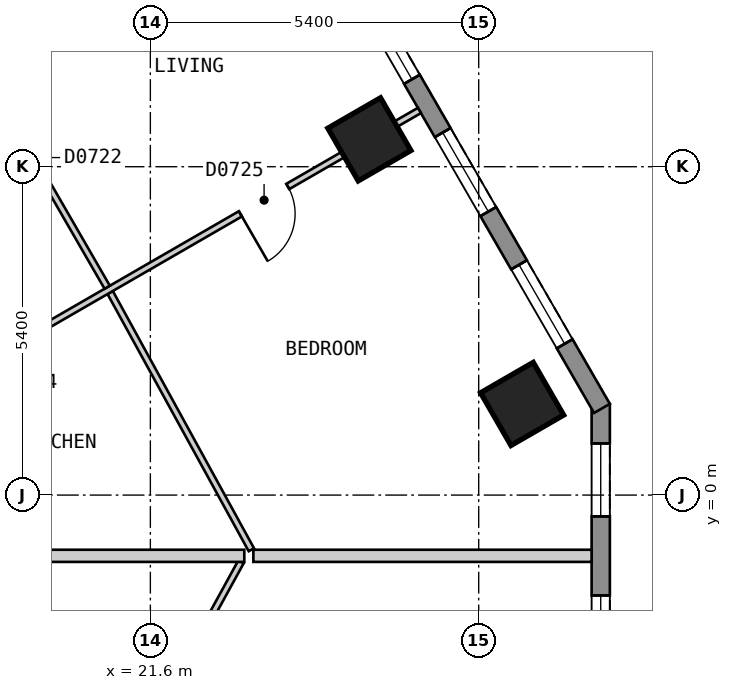
"""IFC4 building model, lengths in metres.
Left out: names, types, materials, properties, quantities, classifications, styles, units other than length and angle.
Written with IfcOpenShell. Run it as: python <this file> out.ifc"""

import sys

from ifc_helpers import new_model, si_unit, direction, frame, frame_2d, origin, origin_2d, place, context, subcontext, project, spatial, polyline, rectangle, outline, extrude, element, fill, save


model = new_model("IFC4")
c1 = context("Model", 3, precision=1e-05, world=origin(), true_north=direction((0.0, 1.0)))
c2 = subcontext(c1, "Body", "Model", "MODEL_VIEW")
j1 = project(units=[si_unit("LENGTHUNIT", "METRE"), si_unit("PLANEANGLEUNIT", "RADIAN")], contexts=[c1])
p1 = place(None, origin())
s1 = spatial("IfcSite", under=j1, at=p1, CompositionType="ELEMENT")
p2 = place(p1, origin())
s2 = spatial("IfcBuilding", under=s1, at=p2, CompositionType="ELEMENT")
p3 = place(p2, frame((0.0, 0.0, 99.0)))
s3 = spatial("IfcBuildingStorey", under=s2, at=p3, CompositionType="ELEMENT", Elevation=99.0)
for number, where, z_axis, x_axis in (
    (1, (27.714, 1.499, 0.0), (0.0, 0.0, 1.0), (-0.5, 0.866, 0.0)),
    (2, (25.202, 5.85, 0.0), (0.0, 0.0, 1.0), (-0.5, 0.866, 0.0)),
):
    element("IfcColumn", number, at=place(p3, frame(where, z_axis=z_axis, x_axis=x_axis)), inside=s3, PredefinedType="COLUMN", context=c2, shape_type="SweptSolid", body=[
        extrude(rectangle(XDim=1.0, YDim=1.0, at=origin_2d()), origin(), (0.0, 0.0, 1.0), 3.0),
    ])
p4 = place(p3, frame((29.007, -3.5, 0.0), z_axis=(0.0, 0.0, 1.0), x_axis=(0.0, 1.0, 0.0)))
e3 = element("IfcWall", 3, at=p4, inside=s3, PredefinedType="SOLIDWALL", context=c2, shape_type="SweptSolid", body=[
    extrude(outline(polyline([(0.0, -0.15), (5.0, -0.15), (4.92, 0.15), (0.08, 0.15), (0.0, -0.15)])), origin(), (0.0, 0.0, 1.0), 2.7),
])
p5 = place(p4, frame((0.65, 0.0, 0.15)))
e4 = element("IfcOpeningElement", 4, at=p5, cuts=e3, PredefinedType="OPENING", context=c2, shape_type="SweptSolid", body=[
    extrude(rectangle(XDim=1.2, YDim=2.1, at=frame_2d((0.6, 1.05))), frame((0.0, 0.16, 0.0), z_axis=(0.0, -1.0, 0.0), x_axis=(1.0, 0.0, 0.0)), (0.0, 0.0, 1.0), 0.32),
])
p6 = place(p4, frame((3.15, 0.0, 0.15)))
e5 = element("IfcOpeningElement", 5, at=p6, cuts=e3, PredefinedType="OPENING", context=c2, shape_type="SweptSolid", body=[
    extrude(rectangle(XDim=1.2, YDim=2.1, at=frame_2d((0.6, 1.05))), frame((0.0, 0.16, 0.0), z_axis=(0.0, -1.0, 0.0), x_axis=(1.0, 0.0, 0.0)), (0.0, 0.0, 1.0), 0.32),
])
p7 = place(p3, frame((29.027, 1.425, 0.0), z_axis=(0.0, 0.0, 1.0), x_axis=(-0.500027479704, 0.866009537788, 0.0)))
e6 = element("IfcWall", 6, at=p7, inside=s3, PredefinedType="SOLIDWALL", context=c2, shape_type="SweptSolid", body=[
    extrude(outline(polyline([(0.0, -0.15), (26.559, -0.15), (26.478, 0.15), (0.08, 0.15), (0.0, -0.15)])), origin(), (0.0, 0.0, 1.0), 2.7),
])
p8 = place(p7, frame((1.227, 0.0, 0.15)))
e7 = element("IfcOpeningElement", 7, at=p8, cuts=e6, PredefinedType="OPENING", context=c2, shape_type="SweptSolid", body=[
    extrude(rectangle(XDim=1.5, YDim=2.1, at=frame_2d((0.75, 1.05))), frame((0.0, 0.16, 0.0), z_axis=(0.0, -1.0, 0.0), x_axis=(1.0, 0.0, 0.0)), (0.0, 0.0, 1.0), 0.32),
])
p9 = place(p7, frame((3.738, 0.0, 0.15)))
e8 = element("IfcOpeningElement", 8, at=p9, cuts=e6, PredefinedType="OPENING", context=c2, shape_type="SweptSolid", body=[
    extrude(rectangle(XDim=1.5, YDim=2.1, at=frame_2d((0.75, 1.05))), frame((0.0, 0.16, 0.0), z_axis=(0.0, -1.0, 0.0), x_axis=(1.0, 0.0, 0.0)), (0.0, 0.0, 1.0), 0.32),
])
p10 = place(p7, frame((6.25, 0.0, 0.15)))
e9 = element("IfcOpeningElement", 9, at=p10, cuts=e6, PredefinedType="OPENING", context=c2, shape_type="SweptSolid", body=[
    extrude(rectangle(XDim=1.5, YDim=2.1, at=frame_2d((0.75, 1.05))), frame((0.0, 0.16, 0.0), z_axis=(0.0, -1.0, 0.0), x_axis=(1.0, 0.0, 0.0)), (0.0, 0.0, 1.0), 0.32),
])
p11 = place(p7, frame((8.761, 0.0, 0.15)))
e10 = element("IfcOpeningElement", 10, at=p11, cuts=e6, PredefinedType="OPENING", context=c2, shape_type="SweptSolid", body=[
    extrude(rectangle(XDim=1.5, YDim=2.1, at=frame_2d((0.75, 1.05))), frame((0.0, 0.16, 0.0), z_axis=(0.0, -1.0, 0.0), x_axis=(1.0, 0.0, 0.0)), (0.0, 0.0, 1.0), 0.32),
])
p12 = place(p7, frame((11.273, 0.0, 0.15)))
e11 = element("IfcOpeningElement", 11, at=p12, cuts=e6, PredefinedType="OPENING", context=c2, shape_type="SweptSolid", body=[
    extrude(rectangle(XDim=1.5, YDim=2.1, at=frame_2d((0.75, 1.05))), frame((0.0, 0.16, 0.0), z_axis=(0.0, -1.0, 0.0), x_axis=(1.0, 0.0, 0.0)), (0.0, 0.0, 1.0), 0.32),
])
p13 = place(p7, frame((13.785, 0.0, 0.15)))
e12 = element("IfcOpeningElement", 12, at=p13, cuts=e6, PredefinedType="OPENING", context=c2, shape_type="SweptSolid", body=[
    extrude(rectangle(XDim=1.5, YDim=2.1, at=frame_2d((0.75, 1.05))), frame((0.0, 0.16, 0.0), z_axis=(0.0, -1.0, 0.0), x_axis=(1.0, 0.0, 0.0)), (0.0, 0.0, 1.0), 0.32),
])
p14 = place(p7, frame((16.296, 0.0, 0.15)))
e13 = element("IfcOpeningElement", 13, at=p14, cuts=e6, PredefinedType="OPENING", context=c2, shape_type="SweptSolid", body=[
    extrude(rectangle(XDim=1.5, YDim=2.1, at=frame_2d((0.75, 1.05))), frame((0.0, 0.16, 0.0), z_axis=(0.0, -1.0, 0.0), x_axis=(1.0, 0.0, 0.0)), (0.0, 0.0, 1.0), 0.32),
])
p15 = place(p7, frame((18.807, 0.0, 0.15)))
e14 = element("IfcOpeningElement", 14, at=p15, cuts=e6, PredefinedType="OPENING", context=c2, shape_type="SweptSolid", body=[
    extrude(rectangle(XDim=1.5, YDim=2.1, at=frame_2d((0.75, 1.05))), frame((0.0, 0.16, 0.0), z_axis=(0.0, -1.0, 0.0), x_axis=(1.0, 0.0, 0.0)), (0.0, 0.0, 1.0), 0.32),
])
p16 = place(p7, frame((21.319, 0.0, 0.15)))
e15 = element("IfcOpeningElement", 15, at=p16, cuts=e6, PredefinedType="OPENING", context=c2, shape_type="SweptSolid", body=[
    extrude(rectangle(XDim=1.5, YDim=2.1, at=frame_2d((0.75, 1.05))), frame((0.0, 0.16, 0.0), z_axis=(0.0, -1.0, 0.0), x_axis=(1.0, 0.0, 0.0)), (0.0, 0.0, 1.0), 0.32),
])
p17 = place(p7, frame((23.831, 0.0, 0.15)))
e16 = element("IfcOpeningElement", 16, at=p17, cuts=e6, PredefinedType="OPENING", context=c2, shape_type="SweptSolid", body=[
    extrude(rectangle(XDim=1.5, YDim=2.1, at=frame_2d((0.75, 1.05))), frame((0.0, 0.16, 0.0), z_axis=(0.0, -1.0, 0.0), x_axis=(1.0, 0.0, 0.0)), (0.0, 0.0, 1.0), 0.32),
])
p18 = place(p3, frame((20.939, 3.331, 0.0), z_axis=(0.0, 0.0, 1.0), x_axis=(0.481207738216, -0.876606589458, 0.0)))
e17 = element("IfcWall", 17, at=p18, inside=s3, PredefinedType="PARTITIONING", context=c2, shape_type="SweptSolid", body=[
    extrude(rectangle(XDim=4.825, YDim=0.1, at=frame_2d((2.413, 0.0))), origin(), (0.0, 0.0, 1.0), 2.7),
])
p19 = place(p3, frame((20.812, -5.248, 0.0), z_axis=(0.0, 0.0, 1.0), x_axis=(0.481296891345, 0.876557643502, 0.0)))
e18 = element("IfcWall", 18, at=p19, inside=s3, PredefinedType="PARTITIONING", context=c2, shape_type="SweptSolid", body=[
    extrude(rectangle(XDim=4.733, YDim=0.1, at=frame_2d((2.367, 0.0))), origin(), (0.0, 0.0, 1.0), 2.7),
])
p20 = place(p3, frame((17.365, 1.325, 0.0), z_axis=(0.0, 0.0, 1.0), x_axis=(0.866016855193, 0.500014806302, 0.0)))
e19 = element("IfcWall", 19, at=p20, inside=s3, PredefinedType="PARTITIONING", context=c2, shape_type="SweptSolid", body=[
    extrude(rectangle(XDim=10.0, YDim=0.1, at=frame_2d((5.0, 0.0))), origin(), (0.0, 0.0, 1.0), 2.7),
])
p21 = place(p20, frame((1.55, 0.0, 0.0)))
e20 = element("IfcOpeningElement", 20, at=p21, cuts=e19, PredefinedType="OPENING", context=c2, shape_type="SweptSolid", body=[
    extrude(rectangle(XDim=0.9, YDim=2.1, at=frame_2d((0.45, 1.05))), frame((0.0, 0.06, 0.0), z_axis=(0.0, -1.0, 0.0), x_axis=(1.0, 0.0, 0.0)), (0.0, 0.0, 1.0), 0.12),
])
p22 = place(p20, frame((6.6, 0.0, 0.0)))
e21 = element("IfcOpeningElement", 21, at=p22, cuts=e19, PredefinedType="OPENING", context=c2, shape_type="SweptSolid", body=[
    extrude(rectangle(XDim=0.9, YDim=2.1, at=frame_2d((0.45, 1.05))), frame((0.0, 0.06, 0.0), z_axis=(0.0, -1.0, 0.0), x_axis=(1.0, 0.0, 0.0)), (0.0, 0.0, 1.0), 0.12),
])
p23 = place(p3, frame((14.853, 5.675, 0.0), z_axis=(0.0, 0.0, 1.0), x_axis=(0.866016855193, 0.500014806302, 0.0)))
e22 = element("IfcWall", 22, at=p23, inside=s3, PredefinedType="PARTITIONING", context=c2, shape_type="SweptSolid", body=[
    extrude(rectangle(XDim=10.0, YDim=0.1, at=frame_2d((5.0, 0.0))), origin(), (0.0, 0.0, 1.0), 2.7),
])
p24 = place(p23, frame((1.6, 0.0, 0.0)))
e23 = element("IfcOpeningElement", 23, at=p24, cuts=e22, PredefinedType="OPENING", context=c2, shape_type="SweptSolid", body=[
    extrude(rectangle(XDim=0.8, YDim=2.1, at=frame_2d((0.4, 1.05))), frame((0.0, 0.06, 0.0), z_axis=(0.0, -1.0, 0.0), x_axis=(1.0, 0.0, 0.0)), (0.0, 0.0, 1.0), 0.12),
])
p25 = place(p23, frame((6.6, 0.0, 0.0)))
e24 = element("IfcOpeningElement", 24, at=p25, cuts=e22, PredefinedType="OPENING", context=c2, shape_type="SweptSolid", body=[
    extrude(rectangle(XDim=0.9, YDim=2.1, at=frame_2d((0.45, 1.05))), frame((0.0, 0.06, 0.0), z_axis=(0.0, -1.0, 0.0), x_axis=(1.0, 0.0, 0.0)), (0.0, 0.0, 1.0), 0.12),
])
p26 = place(p3, frame((18.591, -0.999, 0.0), z_axis=(0.0, 0.0, 1.0), x_axis=(1.0, 0.0, 0.0)))
e25 = element("IfcWall", 25, at=p26, inside=s3, PredefinedType="PARTITIONING", context=c2, shape_type="SweptSolid", body=[
    extrude(rectangle(XDim=4.554, YDim=0.2, at=frame_2d((2.277, 0.0))), origin(), (0.0, 0.0, 1.0), 2.7),
])
p27 = place(p3, frame((23.294, -0.999, 0.0), z_axis=(0.0, 0.0, 1.0), x_axis=(1.0, 0.0, 0.0)))
e26 = element("IfcWall", 26, at=p27, inside=s3, PredefinedType="PARTITIONING", context=c2, shape_type="SweptSolid", body=[
    extrude(rectangle(XDim=5.563, YDim=0.2, at=frame_2d((2.781, 0.0))), origin(), (0.0, 0.0, 1.0), 2.7),
])
p28 = place(p3, frame((18.403, 7.725, 0.0), z_axis=(0.0, 0.0, 1.0), x_axis=(0.500014231302, -0.866017187182, 0.0)))
e27 = element("IfcWall", 27, at=p28, inside=s3, PredefinedType="PARTITIONING", context=c2, shape_type="SweptSolid", body=[
    extrude(rectangle(XDim=4.973, YDim=0.1, at=frame_2d((2.487, 0.0))), origin(), (0.0, 0.0, 1.0), 2.7),
])
p29 = place(p28, frame((2.061, 0.0, 0.0)))
e28 = element("IfcOpeningElement", 28, at=p29, cuts=e27, PredefinedType="OPENING", context=c2, shape_type="SweptSolid", body=[
    extrude(rectangle(XDim=0.9, YDim=2.1, at=frame_2d((0.45, 1.05))), frame((0.0, 0.06, 0.0), z_axis=(0.0, -1.0, 0.0), x_axis=(1.0, 0.0, 0.0)), (0.0, 0.0, 1.0), 0.12),
])
p30 = place(p5, origin())
e29 = element("IfcWindow", 29, at=p30, inside=s3, PartitioningType="SINGLE_PANEL", PredefinedType="WINDOW", context=c2, shape_type="SweptSolid", body=[
    extrude(rectangle(XDim=1.2, YDim=2.1, at=frame_2d((0.6, 1.05))), frame((0.0, 0.03, 0.0), z_axis=(0.0, -1.0, 0.0), x_axis=(1.0, 0.0, 0.0)), (0.0, 0.0, 1.0), 0.06),
])
fill(e4, e29)
p31 = place(p6, origin())
e30 = element("IfcWindow", 30, at=p31, inside=s3, PartitioningType="SINGLE_PANEL", PredefinedType="WINDOW", context=c2, shape_type="SweptSolid", body=[
    extrude(rectangle(XDim=1.2, YDim=2.1, at=frame_2d((0.6, 1.05))), frame((0.0, 0.03, 0.0), z_axis=(0.0, -1.0, 0.0), x_axis=(1.0, 0.0, 0.0)), (0.0, 0.0, 1.0), 0.06),
])
fill(e5, e30)
p32 = place(p8, origin())
e31 = element("IfcWindow", 31, at=p32, inside=s3, PartitioningType="SINGLE_PANEL", PredefinedType="WINDOW", context=c2, shape_type="SweptSolid", body=[
    extrude(rectangle(XDim=1.5, YDim=2.1, at=frame_2d((0.75, 1.05))), frame((0.0, 0.03, 0.0), z_axis=(0.0, -1.0, 0.0), x_axis=(1.0, 0.0, 0.0)), (0.0, 0.0, 1.0), 0.06),
])
fill(e7, e31)
p33 = place(p9, origin())
e32 = element("IfcWindow", 32, at=p33, inside=s3, PartitioningType="SINGLE_PANEL", PredefinedType="WINDOW", context=c2, shape_type="SweptSolid", body=[
    extrude(rectangle(XDim=1.5, YDim=2.1, at=frame_2d((0.75, 1.05))), frame((0.0, 0.03, 0.0), z_axis=(0.0, -1.0, 0.0), x_axis=(1.0, 0.0, 0.0)), (0.0, 0.0, 1.0), 0.06),
])
fill(e8, e32)
p34 = place(p10, origin())
e33 = element("IfcWindow", 33, at=p34, inside=s3, PartitioningType="SINGLE_PANEL", PredefinedType="WINDOW", context=c2, shape_type="SweptSolid", body=[
    extrude(rectangle(XDim=1.5, YDim=2.1, at=frame_2d((0.75, 1.05))), frame((0.0, 0.03, 0.0), z_axis=(0.0, -1.0, 0.0), x_axis=(1.0, 0.0, 0.0)), (0.0, 0.0, 1.0), 0.06),
])
fill(e9, e33)
p35 = place(p22, origin())
e34 = element("IfcDoor", 34, at=p35, inside=s3, OperationType="SINGLE_SWING_LEFT", PredefinedType="DOOR", context=c2, shape_type="SweptSolid", body=[
    extrude(rectangle(XDim=0.9, YDim=2.1, at=frame_2d((0.45, 1.05))), frame((0.0, 0.025, 0.0), z_axis=(0.0, -1.0, 0.0), x_axis=(1.0, 0.0, 0.0)), (0.0, 0.0, 1.0), 0.05),
])
fill(e21, e34)
save(model, sys.argv[1])
